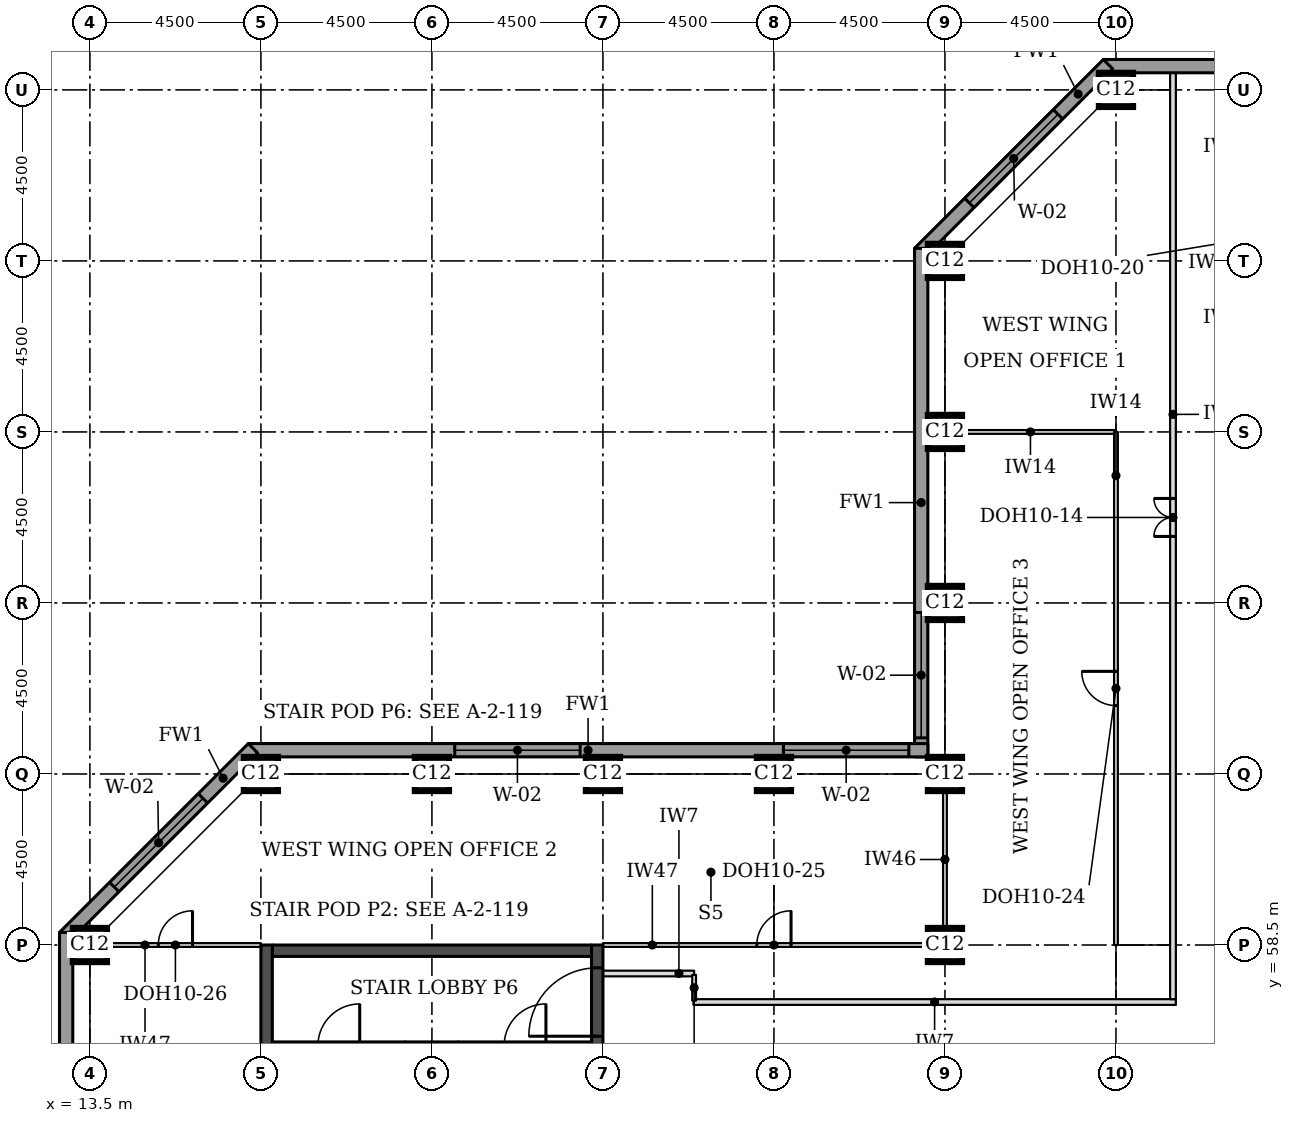
"""IFC4 building model, lengths in metres.
Left out: names, types, materials, properties, quantities, classifications, styles, units other than length and angle.
Written with IfcOpenShell. Run it as: python <this file> out.ifc"""

import sys

from ifc_helpers import new_model, si_unit, direction, frame, frame_2d, origin, origin_2d, place, context, subcontext, project, spatial, rectangle, extrude, element, fill, save


model = new_model("IFC4")
c1 = context("Model", 3, precision=1e-05, world=origin(), true_north=direction((0.0, 1.0)))
c2 = subcontext(c1, "Body", "Model", "MODEL_VIEW")
j1 = project(units=[si_unit("LENGTHUNIT", "METRE"), si_unit("PLANEANGLEUNIT", "RADIAN")], contexts=[c1])
p1 = place(None, origin())
s1 = spatial("IfcSite", under=j1, at=p1, CompositionType="ELEMENT")
p2 = place(p1, origin())
s2 = spatial("IfcBuilding", under=s1, at=p2, CompositionType="ELEMENT")
p3 = place(p2, frame((0.0, 0.0, 226.7)))
s3 = spatial("IfcBuildingStorey", under=s2, at=p3, CompositionType="ELEMENT", Elevation=226.7)
for number, where, z_axis, x_axis in (
    (1, (13.5, 58.5, 0.0), (0.0, 0.0, 1.0), (1.0, 0.0, 0.0)),
    (2, (36.0, 58.5, 0.0), (0.0, 0.0, 1.0), (1.0, 0.0, 0.0)),
    (3, (18.0, 63.0, 0.0), (0.0, 0.0, 1.0), (1.0, 0.0, 0.0)),
    (4, (22.5, 63.0, 0.0), (0.0, 0.0, 1.0), (1.0, 0.0, 0.0)),
    (5, (27.0, 63.0, 0.0), (0.0, 0.0, 1.0), (1.0, 0.0, 0.0)),
    (6, (31.5, 63.0, 0.0), (0.0, 0.0, 1.0), (1.0, 0.0, 0.0)),
    (7, (36.0, 63.0, 0.0), (0.0, 0.0, 1.0), (1.0, 0.0, 0.0)),
    (8, (36.0, 67.5, 0.0), (0.0, 0.0, 1.0), (1.0, 0.0, 0.0)),
    (9, (36.0, 72.0, 0.0), (0.0, 0.0, 1.0), (1.0, 0.0, 0.0)),
    (10, (36.0, 76.5, 0.0), (0.0, 0.0, 1.0), (1.0, 0.0, 0.0)),
    (11, (40.5, 81.0, 0.0), (0.0, 0.0, 1.0), (1.0, 0.0, 0.0)),
):
    element("IfcColumn", number, at=place(p3, frame(where, z_axis=z_axis, x_axis=x_axis)), inside=s3, PredefinedType="COLUMN", context=c2, shape_type="SweptSolid", body=[
        extrude(rectangle(XDim=0.9, YDim=0.9, at=origin_2d()), origin(), (0.0, 0.0, 1.0), 3.7),
    ])
p4 = place(p3, frame((18.3, 58.35, 0.0), z_axis=(0.0, 0.0, 1.0), x_axis=(1.0, 0.0, 0.0)))
e12 = element("IfcWall", 12, at=p4, inside=s3, PredefinedType="SHEAR", context=c2, shape_type="SweptSolid", body=[
    extrude(rectangle(XDim=8.4, YDim=0.3, at=frame_2d((4.2, 0.0))), origin(), (0.0, 0.0, 1.0), 3.7),
])
p5 = place(p3, frame((18.15, 49.5, 0.0), z_axis=(0.0, 0.0, 1.0), x_axis=(0.0, 1.0, 0.0)))
e13 = element("IfcWall", 13, at=p5, inside=s3, PredefinedType="SHEAR", context=c2, shape_type="SweptSolid", body=[
    extrude(rectangle(XDim=9.0, YDim=0.3, at=frame_2d((4.5, 0.0))), origin(), (0.0, 0.0, 1.0), 3.7),
])
p6 = place(p3, frame((26.85, 49.5, 0.0), z_axis=(0.0, 0.0, 1.0), x_axis=(0.0, 1.0, 0.0)))
e14 = element("IfcWall", 14, at=p6, inside=s3, PredefinedType="SHEAR", context=c2, shape_type="SweptSolid", body=[
    extrude(rectangle(XDim=9.0, YDim=0.3, at=frame_2d((4.5, 0.0))), origin(), (0.0, 0.0, 1.0), 3.7),
])
p7 = place(p6, frame((6.6, 0.0, 0.0)))
e15 = element("IfcOpeningElement", 15, at=p7, cuts=e14, PredefinedType="OPENING", context=c2, shape_type="SweptSolid", body=[
    extrude(rectangle(XDim=1.8, YDim=2.1, at=frame_2d((0.9, 1.05))), frame((0.0, 0.16, 0.0), z_axis=(0.0, -1.0, 0.0), x_axis=(1.0, 0.0, 0.0)), (0.0, 0.0, 1.0), 0.32),
])
p8 = place(p3, frame((72.331, 81.625, 0.0), z_axis=(0.0, 0.0, 1.0), x_axis=(-1.0, 0.0, 0.0)))
e16 = element("IfcWall", 16, at=p8, inside=s3, PredefinedType="STANDARD", context=c2, shape_type="SweptSolid", body=[
    extrude(rectangle(XDim=32.163, YDim=0.35, at=frame_2d((16.081, 0.0))), origin(), (0.0, 0.0, 1.0), 3.525),
])
p9 = place(p8, frame((5.431, 0.0, 0.9)))
e17 = element("IfcOpeningElement", 17, at=p9, cuts=e16, PredefinedType="OPENING", context=c2, shape_type="SweptSolid", body=[
    extrude(rectangle(XDim=3.3, YDim=1.9, at=frame_2d((1.65, 0.95))), frame((0.0, 0.185, 0.0), z_axis=(0.0, -1.0, 0.0), x_axis=(1.0, 0.0, 0.0)), (0.0, 0.0, 1.0), 0.37),
])
p10 = place(p8, frame((9.931, 0.0, 0.9)))
e18 = element("IfcOpeningElement", 18, at=p10, cuts=e16, PredefinedType="OPENING", context=c2, shape_type="SweptSolid", body=[
    extrude(rectangle(XDim=3.3, YDim=1.9, at=frame_2d((1.65, 0.95))), frame((0.0, 0.185, 0.0), z_axis=(0.0, -1.0, 0.0), x_axis=(1.0, 0.0, 0.0)), (0.0, 0.0, 1.0), 0.37),
])
p11 = place(p8, frame((14.431, 0.0, 0.9)))
e19 = element("IfcOpeningElement", 19, at=p11, cuts=e16, PredefinedType="OPENING", context=c2, shape_type="SweptSolid", body=[
    extrude(rectangle(XDim=3.3, YDim=1.9, at=frame_2d((1.65, 0.95))), frame((0.0, 0.185, 0.0), z_axis=(0.0, -1.0, 0.0), x_axis=(1.0, 0.0, 0.0)), (0.0, 0.0, 1.0), 0.37),
])
p12 = place(p8, frame((18.931, 0.0, 0.9)))
e20 = element("IfcOpeningElement", 20, at=p12, cuts=e16, PredefinedType="OPENING", context=c2, shape_type="SweptSolid", body=[
    extrude(rectangle(XDim=3.3, YDim=1.9, at=frame_2d((1.65, 0.95))), frame((0.0, 0.185, 0.0), z_axis=(0.0, -1.0, 0.0), x_axis=(1.0, 0.0, 0.0)), (0.0, 0.0, 1.0), 0.37),
])
p13 = place(p8, frame((23.431, 0.0, 0.9)))
e21 = element("IfcOpeningElement", 21, at=p13, cuts=e16, PredefinedType="OPENING", context=c2, shape_type="SweptSolid", body=[
    extrude(rectangle(XDim=3.3, YDim=1.9, at=frame_2d((1.65, 0.95))), frame((0.0, 0.185, 0.0), z_axis=(0.0, -1.0, 0.0), x_axis=(1.0, 0.0, 0.0)), (0.0, 0.0, 1.0), 0.37),
])
p14 = place(p3, frame((40.292, 81.676, 0.0), z_axis=(0.0, 0.0, 1.0), x_axis=(-0.707106781187, -0.707106781187, 0.0)))
e22 = element("IfcWall", 22, at=p14, inside=s3, PredefinedType="STANDARD", context=c2, shape_type="SweptSolid", body=[
    extrude(rectangle(XDim=7.027, YDim=0.35, at=frame_2d((3.513, 0.0))), origin(), (0.0, 0.0, 1.0), 3.525),
])
p15 = place(p14, frame((1.863, 0.0, 0.9)))
e23 = element("IfcOpeningElement", 23, at=p15, cuts=e22, PredefinedType="OPENING", context=c2, shape_type="SweptSolid", body=[
    extrude(rectangle(XDim=3.3, YDim=1.9, at=frame_2d((1.65, 0.95))), frame((0.0, 0.185, 0.0), z_axis=(0.0, -1.0, 0.0), x_axis=(1.0, 0.0, 0.0)), (0.0, 0.0, 1.0), 0.37),
])
p16 = place(p3, frame((35.375, 76.831, 0.0), z_axis=(0.0, 0.0, 1.0), x_axis=(0.0, -1.0, 0.0)))
e24 = element("IfcWall", 24, at=p16, inside=s3, PredefinedType="STANDARD", context=c2, shape_type="SweptSolid", body=[
    extrude(rectangle(XDim=13.381, YDim=0.35, at=frame_2d((6.691, 0.0))), origin(), (0.0, 0.0, 1.0), 3.525),
])
p17 = place(p16, frame((9.581, 0.0, 0.9)))
e25 = element("IfcOpeningElement", 25, at=p17, cuts=e24, PredefinedType="OPENING", context=c2, shape_type="SweptSolid", body=[
    extrude(rectangle(XDim=3.3, YDim=1.9, at=frame_2d((1.65, 0.95))), frame((0.0, 0.185, 0.0), z_axis=(0.0, -1.0, 0.0), x_axis=(1.0, 0.0, 0.0)), (0.0, 0.0, 1.0), 0.37),
])
p18 = place(p3, frame((35.55, 63.625, 0.0), z_axis=(0.0, 0.0, 1.0), x_axis=(-1.0, 0.0, 0.0)))
e26 = element("IfcWall", 26, at=p18, inside=s3, PredefinedType="STANDARD", context=c2, shape_type="SweptSolid", body=[
    extrude(rectangle(XDim=17.881, YDim=0.35, at=frame_2d((8.941, 0.0))), origin(), (0.0, 0.0, 1.0), 3.525),
])
p19 = place(p18, frame((0.5, 0.0, 0.9)))
e27 = element("IfcOpeningElement", 27, at=p19, cuts=e26, PredefinedType="OPENING", context=c2, shape_type="SweptSolid", body=[
    extrude(rectangle(XDim=3.3, YDim=1.9, at=frame_2d((1.65, 0.95))), frame((0.0, 0.185, 0.0), z_axis=(0.0, -1.0, 0.0), x_axis=(1.0, 0.0, 0.0)), (0.0, 0.0, 1.0), 0.37),
])
p20 = place(p18, frame((9.15, 0.0, 0.9)))
e28 = element("IfcOpeningElement", 28, at=p20, cuts=e26, PredefinedType="OPENING", context=c2, shape_type="SweptSolid", body=[
    extrude(rectangle(XDim=3.3, YDim=1.9, at=frame_2d((1.65, 0.95))), frame((0.0, 0.185, 0.0), z_axis=(0.0, -1.0, 0.0), x_axis=(1.0, 0.0, 0.0)), (0.0, 0.0, 1.0), 0.37),
])
p21 = place(p3, frame((17.792, 63.676, 0.0), z_axis=(0.0, 0.0, 1.0), x_axis=(-0.707106781187, -0.707106781187, 0.0)))
e29 = element("IfcWall", 29, at=p21, inside=s3, PredefinedType="STANDARD", context=c2, shape_type="SweptSolid", body=[
    extrude(rectangle(XDim=7.027, YDim=0.35, at=frame_2d((3.513, 0.0))), origin(), (0.0, 0.0, 1.0), 3.525),
])
p22 = place(p21, frame((1.863, 0.0, 0.9)))
e30 = element("IfcOpeningElement", 30, at=p22, cuts=e29, PredefinedType="OPENING", context=c2, shape_type="SweptSolid", body=[
    extrude(rectangle(XDim=3.3, YDim=1.9, at=frame_2d((1.65, 0.95))), frame((0.0, 0.185, 0.0), z_axis=(0.0, -1.0, 0.0), x_axis=(1.0, 0.0, 0.0)), (0.0, 0.0, 1.0), 0.37),
])
p23 = place(p3, frame((12.875, 58.831, 0.0), z_axis=(0.0, 0.0, 1.0), x_axis=(0.0, -1.0, 0.0)))
e31 = element("IfcWall", 31, at=p23, inside=s3, PredefinedType="STANDARD", context=c2, shape_type="SweptSolid", body=[
    extrude(rectangle(XDim=14.163, YDim=0.35, at=frame_2d((7.081, 0.0))), origin(), (0.0, 0.0, 1.0), 3.525),
])
p24 = place(p23, frame((5.431, 0.0, 0.9)))
e32 = element("IfcOpeningElement", 32, at=p24, cuts=e31, PredefinedType="OPENING", context=c2, shape_type="SweptSolid", body=[
    extrude(rectangle(XDim=3.3, YDim=1.9, at=frame_2d((1.65, 0.95))), frame((0.0, 0.185, 0.0), z_axis=(0.0, -1.0, 0.0), x_axis=(1.0, 0.0, 0.0)), (0.0, 0.0, 1.0), 0.37),
])
p25 = place(p3, frame((29.38, 57.0, 0.0), z_axis=(0.0, 0.0, 1.0), x_axis=(1.0, 0.0, 0.0)))
e33 = element("IfcWall", 33, at=p25, inside=s3, PredefinedType="PARTITIONING", context=c2, shape_type="SweptSolid", body=[
    extrude(rectangle(XDim=12.695, YDim=0.15, at=frame_2d((6.348, 0.0))), origin(), (0.0, 0.0, 1.0), 3.55),
])
p26 = place(p3, frame((42.0, 57.075, 0.0), z_axis=(0.0, 0.0, 1.0), x_axis=(0.0, 1.0, 0.0)))
e34 = element("IfcWall", 34, at=p26, inside=s3, PredefinedType="PARTITIONING", context=c2, shape_type="SweptSolid", body=[
    extrude(rectangle(XDim=24.375, YDim=0.15, at=frame_2d((12.188, 0.0))), origin(), (0.0, 0.0, 1.0), 3.55),
])
p27 = place(p26, frame((12.175, 0.0, 0.0)))
e35 = element("IfcOpeningElement", 35, at=p27, cuts=e34, PredefinedType="OPENING", context=c2, shape_type="SweptSolid", body=[
    extrude(rectangle(XDim=1.0, YDim=2.1, at=frame_2d((0.5, 1.05))), frame((0.0, 0.085, 0.0), z_axis=(0.0, -1.0, 0.0), x_axis=(1.0, 0.0, 0.0)), (0.0, 0.0, 1.0), 0.17),
])
p28 = place(p3, frame((36.0, 72.0, 0.0), z_axis=(0.0, 0.0, 1.0), x_axis=(1.0, 0.0, 0.0)))
e36 = element("IfcWall", 36, at=p28, inside=s3, PredefinedType="PARTITIONING", context=c2, shape_type="SweptSolid", body=[
    extrude(rectangle(XDim=4.5, YDim=0.1, at=frame_2d((2.25, 0.0))), origin(), (0.0, 0.0, 1.0), 3.55),
])
p29 = place(p3, frame((40.5, 72.0, 0.0), z_axis=(0.0, 0.0, 1.0), x_axis=(0.0, -1.0, 0.0)))
e37 = element("IfcWall", 37, at=p29, inside=s3, PredefinedType="PARTITIONING", context=c2, shape_type="SweptSolid", body=[
    extrude(rectangle(XDim=13.5, YDim=0.1, at=frame_2d((6.75, 0.0))), origin(), (0.0, 0.0, 1.0), 3.55),
])
p30 = place(p29, frame((6.3, 0.0, 0.0)))
e38 = element("IfcOpeningElement", 38, at=p30, cuts=e37, PredefinedType="OPENING", context=c2, shape_type="SweptSolid", body=[
    extrude(rectangle(XDim=0.9, YDim=2.1, at=frame_2d((0.45, 1.05))), frame((0.0, 0.06, 0.0), z_axis=(0.0, -1.0, 0.0), x_axis=(1.0, 0.0, 0.0)), (0.0, 0.0, 1.0), 0.12),
])
p31 = place(p3, frame((36.0, 63.0, 0.0), z_axis=(0.0, 0.0, 1.0), x_axis=(0.0, -1.0, 0.0)))
e39 = element("IfcWall", 39, at=p31, inside=s3, PredefinedType="PARTITIONING", context=c2, shape_type="SweptSolid", body=[
    extrude(rectangle(XDim=4.5, YDim=0.1, at=frame_2d((2.25, 0.0))), origin(), (0.0, 0.0, 1.0), 2.8),
])
p32 = place(p3, frame((36.0, 58.5, 0.0), z_axis=(0.0, 0.0, 1.0), x_axis=(-1.0, 0.0, 0.0)))
e40 = element("IfcWall", 40, at=p32, inside=s3, PredefinedType="PARTITIONING", context=c2, shape_type="SweptSolid", body=[
    extrude(rectangle(XDim=9.0, YDim=0.1, at=frame_2d((4.5, 0.0))), origin(), (0.0, 0.0, 1.0), 2.55),
])
p33 = place(p32, frame((4.05, 0.0, 0.0)))
e41 = element("IfcOpeningElement", 41, at=p33, cuts=e40, PredefinedType="OPENING", context=c2, shape_type="SweptSolid", body=[
    extrude(rectangle(XDim=0.9, YDim=2.1, at=frame_2d((0.45, 1.05))), frame((0.0, 0.06, 0.0), z_axis=(0.0, -1.0, 0.0), x_axis=(1.0, 0.0, 0.0)), (0.0, 0.0, 1.0), 0.12),
])
p34 = place(p3, frame((13.5, 58.5, 0.0), z_axis=(0.0, 0.0, 1.0), x_axis=(1.0, 0.0, 0.0)))
e42 = element("IfcWall", 42, at=p34, inside=s3, PredefinedType="PARTITIONING", context=c2, shape_type="SweptSolid", body=[
    extrude(rectangle(XDim=4.5, YDim=0.1, at=frame_2d((2.25, 0.0))), origin(), (0.0, 0.0, 1.0), 2.55),
])
p35 = place(p34, frame((1.8, 0.0, 0.0)))
e43 = element("IfcOpeningElement", 43, at=p35, cuts=e42, PredefinedType="OPENING", context=c2, shape_type="SweptSolid", body=[
    extrude(rectangle(XDim=0.9, YDim=2.1, at=frame_2d((0.45, 1.05))), frame((0.0, 0.06, 0.0), z_axis=(0.0, -1.0, 0.0), x_axis=(1.0, 0.0, 0.0)), (0.0, 0.0, 1.0), 0.12),
])
p36 = place(p3, frame((27.0, 57.75, 0.0), z_axis=(0.0, 0.0, 1.0), x_axis=(1.0, 0.0, 0.0)))
e44 = element("IfcWall", 44, at=p36, inside=s3, PredefinedType="PARTITIONING", context=c2, shape_type="SweptSolid", body=[
    extrude(rectangle(XDim=2.4, YDim=0.15, at=frame_2d((1.2, 0.0))), origin(), (0.0, 0.0, 1.0), 3.55),
])
p37 = place(p3, frame((29.4, 57.715, 0.0), z_axis=(0.0, 0.0, 1.0), x_axis=(0.0, -1.0, 0.0)))
e45 = element("IfcWall", 45, at=p37, inside=s3, PredefinedType="PARTITIONING", context=c2, shape_type="SweptSolid", body=[
    extrude(rectangle(XDim=0.68, YDim=0.1, at=frame_2d((0.34, 0.0))), origin(), (0.0, 0.0, 1.0), 3.55),
])
p38 = place(p3, frame((21.8, 55.85, 0.0), z_axis=(0.0, 0.0, 1.0), x_axis=(1.0, 0.0, 0.0)))
e46 = element("IfcWall", 46, at=p38, inside=s3, PredefinedType="SOLIDWALL", context=c2, shape_type="SweptSolid", body=[
    extrude(rectangle(XDim=1.4, YDim=0.2, at=frame_2d((0.7, 0.0))), origin(), (0.0, 0.0, 1.0), 3.55),
])
p39 = place(p3, frame((18.3, 55.85, 0.0), z_axis=(0.0, 0.0, 1.0), x_axis=(1.0, 0.0, 0.0)))
e47 = element("IfcWall", 47, at=p39, inside=s3, PredefinedType="SOLIDWALL", context=c2, shape_type="SweptSolid", body=[
    extrude(rectangle(XDim=3.5, YDim=0.2, at=frame_2d((1.75, 0.0))), origin(), (0.0, 0.0, 1.0), 3.55),
])
p40 = place(p39, frame((1.2, 0.0, 0.0)))
e48 = element("IfcOpeningElement", 48, at=p40, cuts=e47, PredefinedType="OPENING", context=c2, shape_type="SweptSolid", body=[
    extrude(rectangle(XDim=1.1, YDim=2.1, at=frame_2d((0.55, 1.05))), frame((0.0, 0.11, 0.0), z_axis=(0.0, -1.0, 0.0), x_axis=(1.0, 0.0, 0.0)), (0.0, 0.0, 1.0), 0.22),
])
p41 = place(p3, frame((23.2, 55.85, 0.0), z_axis=(0.0, 0.0, 1.0), x_axis=(1.0, 0.0, 0.0)))
e49 = element("IfcWall", 49, at=p41, inside=s3, PredefinedType="SOLIDWALL", context=c2, shape_type="SweptSolid", body=[
    extrude(rectangle(XDim=3.5, YDim=0.2, at=frame_2d((1.75, 0.0))), origin(), (0.0, 0.0, 1.0), 3.55),
])
p42 = place(p41, frame((1.2, 0.0, 0.0)))
e50 = element("IfcOpeningElement", 50, at=p42, cuts=e49, PredefinedType="OPENING", context=c2, shape_type="SweptSolid", body=[
    extrude(rectangle(XDim=1.1, YDim=2.1, at=frame_2d((0.55, 1.05))), frame((0.0, 0.11, 0.0), z_axis=(0.0, -1.0, 0.0), x_axis=(1.0, 0.0, 0.0)), (0.0, 0.0, 1.0), 0.22),
])
p43 = place(p15, origin())
e51 = element("IfcWindow", 51, at=p43, inside=s3, PartitioningType="SINGLE_PANEL", PredefinedType="WINDOW", context=c2, shape_type="SweptSolid", body=[
    extrude(rectangle(XDim=3.3, YDim=1.9, at=frame_2d((1.65, 0.95))), frame((0.0, 0.085, 0.0), z_axis=(0.0, -1.0, 0.0), x_axis=(1.0, 0.0, 0.0)), (0.0, 0.0, 1.0), 0.06),
])
fill(e23, e51)
p44 = place(p17, origin())
e52 = element("IfcWindow", 52, at=p44, inside=s3, PartitioningType="SINGLE_PANEL", PredefinedType="WINDOW", context=c2, shape_type="SweptSolid", body=[
    extrude(rectangle(XDim=3.3, YDim=1.9, at=frame_2d((1.65, 0.95))), frame((0.0, 0.085, 0.0), z_axis=(0.0, -1.0, 0.0), x_axis=(1.0, 0.0, 0.0)), (0.0, 0.0, 1.0), 0.06),
])
fill(e25, e52)
p45 = place(p19, origin())
e53 = element("IfcWindow", 53, at=p45, inside=s3, PartitioningType="SINGLE_PANEL", PredefinedType="WINDOW", context=c2, shape_type="SweptSolid", body=[
    extrude(rectangle(XDim=3.3, YDim=1.9, at=frame_2d((1.65, 0.95))), frame((0.0, 0.085, 0.0), z_axis=(0.0, -1.0, 0.0), x_axis=(1.0, 0.0, 0.0)), (0.0, 0.0, 1.0), 0.06),
])
fill(e27, e53)
p46 = place(p20, origin())
e54 = element("IfcWindow", 54, at=p46, inside=s3, PartitioningType="SINGLE_PANEL", PredefinedType="WINDOW", context=c2, shape_type="SweptSolid", body=[
    extrude(rectangle(XDim=3.3, YDim=1.9, at=frame_2d((1.65, 0.95))), frame((0.0, 0.085, 0.0), z_axis=(0.0, -1.0, 0.0), x_axis=(1.0, 0.0, 0.0)), (0.0, 0.0, 1.0), 0.06),
])
fill(e28, e54)
p47 = place(p22, origin())
e55 = element("IfcWindow", 55, at=p47, inside=s3, PartitioningType="SINGLE_PANEL", PredefinedType="WINDOW", context=c2, shape_type="SweptSolid", body=[
    extrude(rectangle(XDim=3.3, YDim=1.9, at=frame_2d((1.65, 0.95))), frame((0.0, 0.085, 0.0), z_axis=(0.0, -1.0, 0.0), x_axis=(1.0, 0.0, 0.0)), (0.0, 0.0, 1.0), 0.06),
])
fill(e30, e55)
p48 = place(p27, origin())
e56 = element("IfcDoor", 56, at=p48, inside=s3, OperationType="DOUBLE_DOOR_SINGLE_SWING", PredefinedType="DOOR", context=c2, shape_type="SweptSolid", body=[
    extrude(rectangle(XDim=1.0, YDim=2.1, at=frame_2d((0.5, 1.05))), frame((0.0, 0.025, 0.0), z_axis=(0.0, -1.0, 0.0), x_axis=(1.0, 0.0, 0.0)), (0.0, 0.0, 1.0), 0.05),
])
fill(e35, e56)
p49 = place(p30, frame((0.9, 0.0, 0.0), z_axis=(0.0, 0.0, 1.0), x_axis=(-1.0, 0.0, 0.0)))
e57 = element("IfcDoor", 57, at=p49, inside=s3, OperationType="SINGLE_SWING_RIGHT", PredefinedType="DOOR", context=c2, shape_type="SweptSolid", body=[
    extrude(rectangle(XDim=0.9, YDim=2.1, at=frame_2d((0.45, 1.05))), frame((0.0, 0.025, 0.0), z_axis=(0.0, -1.0, 0.0), x_axis=(1.0, 0.0, 0.0)), (0.0, 0.0, 1.0), 0.05),
])
fill(e38, e57)
p50 = place(p33, frame((0.9, 0.0, 0.0), z_axis=(0.0, 0.0, 1.0), x_axis=(-1.0, 0.0, 0.0)))
e58 = element("IfcDoor", 58, at=p50, inside=s3, OperationType="SINGLE_SWING_RIGHT", PredefinedType="DOOR", context=c2, shape_type="SweptSolid", body=[
    extrude(rectangle(XDim=0.9, YDim=2.1, at=frame_2d((0.45, 1.05))), frame((0.0, 0.025, 0.0), z_axis=(0.0, -1.0, 0.0), x_axis=(1.0, 0.0, 0.0)), (0.0, 0.0, 1.0), 0.05),
])
fill(e41, e58)
p51 = place(p35, origin())
e59 = element("IfcDoor", 59, at=p51, inside=s3, OperationType="SINGLE_SWING_RIGHT", PredefinedType="DOOR", context=c2, shape_type="SweptSolid", body=[
    extrude(rectangle(XDim=0.9, YDim=2.1, at=frame_2d((0.45, 1.05))), frame((0.0, 0.025, 0.0), z_axis=(0.0, -1.0, 0.0), x_axis=(1.0, 0.0, 0.0)), (0.0, 0.0, 1.0), 0.05),
])
fill(e43, e59)
p52 = place(p7, origin())
e60 = element("IfcDoor", 60, at=p52, inside=s3, OperationType="SINGLE_SWING_LEFT", PredefinedType="DOOR", context=c2, shape_type="SweptSolid", body=[
    extrude(rectangle(XDim=1.8, YDim=2.1, at=frame_2d((0.9, 1.05))), frame((0.0, 0.025, 0.0), z_axis=(0.0, -1.0, 0.0), x_axis=(1.0, 0.0, 0.0)), (0.0, 0.0, 1.0), 0.05),
])
fill(e15, e60)
save(model, sys.argv[1])
